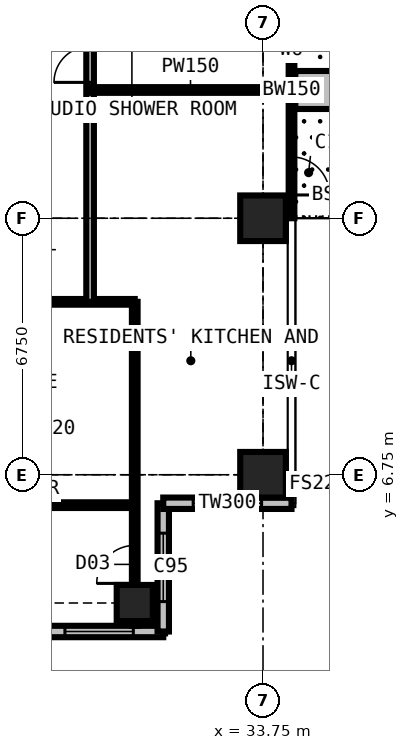
"""IFC4 building model, lengths in metres.
Left out: names, types, materials, properties, quantities, classifications, styles, units other than length and angle.
Written with IfcOpenShell. Run it as: python <this file> out.ifc"""

import sys

from ifc_helpers import new_model, si_unit, direction, frame, frame_2d, origin, origin_2d, place, context, subcontext, project, spatial, rectangle, extrude, element, fill, save


model = new_model("IFC4")
c1 = context("Model", 3, precision=1e-05, world=origin(), true_north=direction((0.0, 1.0)))
c2 = subcontext(c1, "Body", "Model", "MODEL_VIEW")
j1 = project(units=[si_unit("LENGTHUNIT", "METRE"), si_unit("PLANEANGLEUNIT", "RADIAN")], contexts=[c1])
p1 = place(None, origin())
s1 = spatial("IfcSite", under=j1, at=p1, CompositionType="ELEMENT")
p2 = place(p1, origin())
s2 = spatial("IfcBuilding", under=s1, at=p2, CompositionType="ELEMENT")
p3 = place(p2, frame((0.0, 0.0, 192.6)))
s3 = spatial("IfcBuildingStorey", under=s2, at=p3, CompositionType="ELEMENT", Elevation=192.6)
p4 = place(p3, frame((30.375, 3.375, 0.0), z_axis=(0.0, 0.0, 1.0), x_axis=(1.0, 0.0, 0.0)))
e1 = element("IfcColumn", 1, at=p4, inside=s3, PredefinedType="COLUMN", context=c2, shape_type="SweptSolid", body=[
    extrude(rectangle(XDim=0.95, YDim=0.95, at=origin_2d()), origin(), (0.0, 0.0, 1.0), 3.6),
])
for number, where, z_axis, x_axis in (
    (2, (33.75, 6.75, 0.0), (0.0, 0.0, 1.0), (1.0, 0.0, 0.0)),
    (3, (33.75, 13.5, 0.0), (0.0, 0.0, 1.0), (1.0, 0.0, 0.0)),
):
    element("IfcColumn", number, at=place(p3, frame(where, z_axis=z_axis, x_axis=x_axis)), inside=s3, PredefinedType="COLUMN", context=c2, shape_type="SweptSolid", body=[
        extrude(rectangle(XDim=1.2, YDim=1.2, at=origin_2d()), origin(), (0.0, 0.0, 1.0), 3.6),
    ])
p5 = place(p3, frame((34.5, 20.25, 0.0), z_axis=(0.0, 0.0, 1.0), x_axis=(0.0, -1.0, 0.0)))
e4 = element("IfcWall", 4, at=p5, inside=s3, PredefinedType="SOLIDWALL", context=c2, shape_type="SweptSolid", body=[
    extrude(rectangle(XDim=6.75, YDim=0.15, at=frame_2d((3.375, 0.0))), origin(), (0.0, 0.0, 1.0), 3.375),
])
p6 = place(p5, frame((0.613, 0.0, 0.0)))
e5 = element("IfcOpeningElement", 5, at=p6, cuts=e4, PredefinedType="OPENING", context=c2, shape_type="SweptSolid", body=[
    extrude(rectangle(XDim=1.0, YDim=2.2, at=frame_2d((0.5, 1.1))), frame((0.0, 0.085, 0.0), z_axis=(0.0, -1.0, 0.0), x_axis=(1.0, 0.0, 0.0)), (0.0, 0.0, 1.0), 0.17),
])
p7 = place(p5, frame((1.725, 0.0, 0.9)))
e6 = element("IfcOpeningElement", 6, at=p7, cuts=e4, PredefinedType="OPENING", context=c2, shape_type="SweptSolid", body=[
    extrude(rectangle(XDim=1.2, YDim=1.8, at=frame_2d((0.6, 0.9))), frame((0.0, 0.085, 0.0), z_axis=(0.0, -1.0, 0.0), x_axis=(1.0, 0.0, 0.0)), (0.0, 0.0, 1.0), 0.17),
])
p8 = place(p5, frame((5.137, 0.0, 0.0)))
e7 = element("IfcOpeningElement", 7, at=p8, cuts=e4, PredefinedType="OPENING", context=c2, shape_type="SweptSolid", body=[
    extrude(rectangle(XDim=1.0, YDim=2.2, at=frame_2d((0.5, 1.1))), frame((0.0, 0.085, 0.0), z_axis=(0.0, -1.0, 0.0), x_axis=(1.0, 0.0, 0.0)), (0.0, 0.0, 1.0), 0.17),
])
p9 = place(p5, frame((3.825, 0.0, 0.9)))
e8 = element("IfcOpeningElement", 8, at=p9, cuts=e4, PredefinedType="OPENING", context=c2, shape_type="SweptSolid", body=[
    extrude(rectangle(XDim=1.2, YDim=1.8, at=frame_2d((0.6, 0.9))), frame((0.0, 0.085, 0.0), z_axis=(0.0, -1.0, 0.0), x_axis=(1.0, 0.0, 0.0)), (0.0, 0.0, 1.0), 0.17),
])
p10 = place(p3, frame((27.75, 2.625, 0.0), z_axis=(0.0, 0.0, 1.0), x_axis=(1.0, 0.0, 0.0)))
e9 = element("IfcWall", 9, at=p10, inside=s3, PredefinedType="SOLIDWALL", context=c2, shape_type="SweptSolid", body=[
    extrude(rectangle(XDim=3.375, YDim=0.3, at=frame_2d((1.688, 0.0))), origin(), (0.0, 0.0, 1.0), 3.375),
])
p11 = place(p10, frame((0.788, 0.0, 0.6)))
e10 = element("IfcOpeningElement", 10, at=p11, cuts=e9, PredefinedType="OPENING", context=c2, shape_type="SweptSolid", body=[
    extrude(rectangle(XDim=1.8, YDim=2.1, at=frame_2d((0.9, 1.05))), frame((0.0, 0.16, 0.0), z_axis=(0.0, -1.0, 0.0), x_axis=(1.0, 0.0, 0.0)), (0.0, 0.0, 1.0), 0.32),
])
p12 = place(p3, frame((31.125, 2.625, 0.0), z_axis=(0.0, 0.0, 1.0), x_axis=(0.0, 1.0, 0.0)))
e11 = element("IfcWall", 11, at=p12, inside=s3, PredefinedType="SOLIDWALL", context=c2, shape_type="SweptSolid", body=[
    extrude(rectangle(XDim=3.375, YDim=0.3, at=frame_2d((1.688, 0.0))), origin(), (0.0, 0.0, 1.0), 3.375),
])
p13 = place(p12, frame((0.788, 0.0, 0.6)))
e12 = element("IfcOpeningElement", 12, at=p13, cuts=e11, PredefinedType="OPENING", context=c2, shape_type="SweptSolid", body=[
    extrude(rectangle(XDim=1.8, YDim=2.1, at=frame_2d((0.9, 1.05))), frame((0.0, 0.16, 0.0), z_axis=(0.0, -1.0, 0.0), x_axis=(1.0, 0.0, 0.0)), (0.0, 0.0, 1.0), 0.32),
])
p14 = place(p3, frame((31.125, 6.0, 0.0), z_axis=(0.0, 0.0, 1.0), x_axis=(1.0, 0.0, 0.0)))
e13 = element("IfcWall", 13, at=p14, inside=s3, PredefinedType="SOLIDWALL", context=c2, shape_type="SweptSolid", body=[
    extrude(rectangle(XDim=3.375, YDim=0.3, at=frame_2d((1.688, 0.0))), origin(), (0.0, 0.0, 1.0), 3.375),
])
p15 = place(p14, frame((0.788, 0.0, 0.6)))
e14 = element("IfcOpeningElement", 14, at=p15, cuts=e13, PredefinedType="OPENING", context=c2, shape_type="SweptSolid", body=[
    extrude(rectangle(XDim=1.8, YDim=2.1, at=frame_2d((0.9, 1.05))), frame((0.0, 0.16, 0.0), z_axis=(0.0, -1.0, 0.0), x_axis=(1.0, 0.0, 0.0)), (0.0, 0.0, 1.0), 0.32),
])
p16 = place(p3, frame((34.6, 16.875, 0.0), z_axis=(0.0, 0.0, 1.0), x_axis=(1.0, 0.0, 0.0)))
e15 = element("IfcWall", 15, at=p16, inside=s3, PredefinedType="USERDEFINED", context=c2, shape_type="SweptSolid", body=[
    extrude(rectangle(XDim=2.2, YDim=1.0, at=frame_2d((1.1, 0.0))), origin(), (0.0, 0.0, 1.0), 0.9),
])
p17 = place(p3, frame((10.125, 11.3, 0.0), z_axis=(0.0, 0.0, 1.0), x_axis=(1.0, 0.0, 0.0)))
e16 = element("IfcWall", 16, at=p17, inside=s3, PredefinedType="PARTITIONING", context=c2, shape_type="SweptSolid", body=[
    extrude(rectangle(XDim=20.25, YDim=0.15, at=frame_2d((10.125, 0.0))), origin(), (0.0, 0.0, 1.0), 3.375),
])
p18 = place(p17, frame((8.375, 0.0, 0.0)))
e17 = element("IfcOpeningElement", 17, at=p18, cuts=e16, PredefinedType="OPENING", context=c2, shape_type="SweptSolid", body=[
    extrude(rectangle(XDim=1.0, YDim=2.2, at=frame_2d((0.5, 1.1))), frame((0.0, 0.085, 0.0), z_axis=(0.0, -1.0, 0.0), x_axis=(1.0, 0.0, 0.0)), (0.0, 0.0, 1.0), 0.17),
])
p19 = place(p17, frame((10.975, 0.0, 0.0)))
e18 = element("IfcOpeningElement", 18, at=p19, cuts=e16, PredefinedType="OPENING", context=c2, shape_type="SweptSolid", body=[
    extrude(rectangle(XDim=1.0, YDim=2.2, at=frame_2d((0.5, 1.1))), frame((0.0, 0.085, 0.0), z_axis=(0.0, -1.0, 0.0), x_axis=(1.0, 0.0, 0.0)), (0.0, 0.0, 1.0), 0.17),
])
p20 = place(p17, frame((4.875, 0.0, 0.0)))
e19 = element("IfcOpeningElement", 19, at=p20, cuts=e16, PredefinedType="OPENING", context=c2, shape_type="SweptSolid", body=[
    extrude(rectangle(XDim=0.95, YDim=2.2, at=frame_2d((0.475, 1.1))), frame((0.0, 0.085, 0.0), z_axis=(0.0, -1.0, 0.0), x_axis=(1.0, 0.0, 0.0)), (0.0, 0.0, 1.0), 0.17),
])
p21 = place(p3, frame((27.725, 5.95, 0.0), z_axis=(0.0, 0.0, 1.0), x_axis=(1.0, 0.0, 0.0)))
e20 = element("IfcWall", 20, at=p21, inside=s3, PredefinedType="PARTITIONING", context=c2, shape_type="SweptSolid", body=[
    extrude(rectangle(XDim=2.65, YDim=0.15, at=frame_2d((1.325, 0.0))), origin(), (0.0, 0.0, 1.0), 3.375),
])
p22 = place(p3, frame((29.2, 11.3, 0.0), z_axis=(0.0, 0.0, 1.0), x_axis=(0.0, 1.0, 0.0)))
e21 = element("IfcWall", 21, at=p22, inside=s3, PredefinedType="PARTITIONING", context=c2, shape_type="SweptSolid", body=[
    extrude(rectangle(XDim=17.9, YDim=0.2, at=frame_2d((8.95, 0.0))), origin(), (0.0, 0.0, 1.0), 3.375),
])
p23 = place(p22, frame((5.775, 0.0, 0.0)))
e22 = element("IfcOpeningElement", 22, at=p23, cuts=e21, PredefinedType="OPENING", context=c2, shape_type="SweptSolid", body=[
    extrude(rectangle(XDim=0.95, YDim=2.2, at=frame_2d((0.475, 1.1))), frame((0.0, 0.11, 0.0), z_axis=(0.0, -1.0, 0.0), x_axis=(1.0, 0.0, 0.0)), (0.0, 0.0, 1.0), 0.22),
])
p24 = place(p22, frame((9.2, 0.0, 0.0)))
e23 = element("IfcOpeningElement", 23, at=p24, cuts=e21, PredefinedType="OPENING", context=c2, shape_type="SweptSolid", body=[
    extrude(rectangle(XDim=0.95, YDim=2.2, at=frame_2d((0.475, 1.1))), frame((0.0, 0.11, 0.0), z_axis=(0.0, -1.0, 0.0), x_axis=(1.0, 0.0, 0.0)), (0.0, 0.0, 1.0), 0.22),
])
p25 = place(p22, frame((12.575, 0.0, 0.0)))
e24 = element("IfcOpeningElement", 24, at=p25, cuts=e21, PredefinedType="OPENING", context=c2, shape_type="SweptSolid", body=[
    extrude(rectangle(XDim=0.95, YDim=2.2, at=frame_2d((0.475, 1.1))), frame((0.0, 0.11, 0.0), z_axis=(0.0, -1.0, 0.0), x_axis=(1.0, 0.0, 0.0)), (0.0, 0.0, 1.0), 0.22),
])
p26 = place(p22, frame((16.3, 0.0, 0.0)))
e25 = element("IfcOpeningElement", 25, at=p26, cuts=e21, PredefinedType="OPENING", context=c2, shape_type="SweptSolid", body=[
    extrude(rectangle(XDim=1.0, YDim=2.2, at=frame_2d((0.5, 1.1))), frame((0.0, 0.11, 0.0), z_axis=(0.0, -1.0, 0.0), x_axis=(1.0, 0.0, 0.0)), (0.0, 0.0, 1.0), 0.22),
])
p27 = place(p3, frame((29.2, 16.875, 0.0), z_axis=(0.0, 0.0, 1.0), x_axis=(1.0, 0.0, 0.0)))
e26 = element("IfcWall", 26, at=p27, inside=s3, PredefinedType="PARTITIONING", context=c2, shape_type="SweptSolid", body=[
    extrude(rectangle(XDim=5.284, YDim=0.15, at=frame_2d((2.642, 0.0))), origin(), (0.0, 0.0, 1.0), 3.375),
])
p28 = place(p3, frame((30.375, 2.775, 0.0), z_axis=(0.0, 0.0, 1.0), x_axis=(0.0, 1.0, 0.0)))
e27 = element("IfcWall", 27, at=p28, inside=s3, PredefinedType="PARTITIONING", context=c2, shape_type="SweptSolid", body=[
    extrude(rectangle(XDim=8.525, YDim=0.15, at=frame_2d((4.263, 0.0))), origin(), (0.0, 0.0, 1.0), 2.877),
])
p29 = place(p28, frame((1.116, 0.0, 0.0)))
e28 = element("IfcOpeningElement", 28, at=p29, cuts=e27, PredefinedType="OPENING", context=c2, shape_type="SweptSolid", body=[
    extrude(rectangle(XDim=1.0, YDim=2.2, at=frame_2d((0.5, 1.1))), frame((0.0, 0.085, 0.0), z_axis=(0.0, -1.0, 0.0), x_axis=(1.0, 0.0, 0.0)), (0.0, 0.0, 1.0), 0.17),
])
p30 = place(p7, origin())
e29 = element("IfcWindow", 29, at=p30, inside=s3, PartitioningType="SINGLE_PANEL", PredefinedType="WINDOW", context=c2, shape_type="SweptSolid", body=[
    extrude(rectangle(XDim=1.2, YDim=1.8, at=frame_2d((0.6, 0.9))), frame((0.0, 0.03, 0.0), z_axis=(0.0, -1.0, 0.0), x_axis=(1.0, 0.0, 0.0)), (0.0, 0.0, 1.0), 0.06),
])
fill(e6, e29)
p31 = place(p8, origin())
e30 = element("IfcDoor", 30, at=p31, inside=s3, OperationType="SINGLE_SWING_RIGHT", PredefinedType="DOOR", context=c2, shape_type="SweptSolid", body=[
    extrude(rectangle(XDim=1.0, YDim=2.2, at=frame_2d((0.5, 1.1))), frame((0.0, 0.025, 0.0), z_axis=(0.0, -1.0, 0.0), x_axis=(1.0, 0.0, 0.0)), (0.0, 0.0, 1.0), 0.05),
])
fill(e7, e30)
p32 = place(p9, origin())
e31 = element("IfcWindow", 31, at=p32, inside=s3, PartitioningType="SINGLE_PANEL", PredefinedType="WINDOW", context=c2, shape_type="SweptSolid", body=[
    extrude(rectangle(XDim=1.2, YDim=1.8, at=frame_2d((0.6, 0.9))), frame((0.0, 0.03, 0.0), z_axis=(0.0, -1.0, 0.0), x_axis=(1.0, 0.0, 0.0)), (0.0, 0.0, 1.0), 0.06),
])
fill(e8, e31)
p33 = place(p11, origin())
e32 = element("IfcWindow", 32, at=p33, inside=s3, PartitioningType="SINGLE_PANEL", PredefinedType="WINDOW", context=c2, shape_type="SweptSolid", body=[
    extrude(rectangle(XDim=1.8, YDim=2.1, at=frame_2d((0.9, 1.05))), frame((0.0, 0.03, 0.0), z_axis=(0.0, -1.0, 0.0), x_axis=(1.0, 0.0, 0.0)), (0.0, 0.0, 1.0), 0.06),
])
fill(e10, e32)
p34 = place(p13, origin())
e33 = element("IfcWindow", 33, at=p34, inside=s3, PartitioningType="SINGLE_PANEL", PredefinedType="WINDOW", context=c2, shape_type="SweptSolid", body=[
    extrude(rectangle(XDim=1.8, YDim=2.1, at=frame_2d((0.9, 1.05))), frame((0.0, 0.03, 0.0), z_axis=(0.0, -1.0, 0.0), x_axis=(1.0, 0.0, 0.0)), (0.0, 0.0, 1.0), 0.06),
])
fill(e12, e33)
p35 = place(p15, origin())
e34 = element("IfcWindow", 34, at=p35, inside=s3, PartitioningType="SINGLE_PANEL", PredefinedType="WINDOW", context=c2, shape_type="SweptSolid", body=[
    extrude(rectangle(XDim=1.8, YDim=2.1, at=frame_2d((0.9, 1.05))), frame((0.0, 0.03, 0.0), z_axis=(0.0, -1.0, 0.0), x_axis=(1.0, 0.0, 0.0)), (0.0, 0.0, 1.0), 0.06),
])
fill(e14, e34)
p36 = place(p29, origin())
e35 = element("IfcDoor", 35, at=p36, inside=s3, OperationType="SINGLE_SWING_LEFT", PredefinedType="DOOR", context=c2, shape_type="SweptSolid", body=[
    extrude(rectangle(XDim=1.0, YDim=2.2, at=frame_2d((0.5, 1.1))), frame((0.0, 0.025, 0.0), z_axis=(0.0, -1.0, 0.0), x_axis=(1.0, 0.0, 0.0)), (0.0, 0.0, 1.0), 0.05),
])
fill(e28, e35)
p37 = place(p23, origin())
e36 = element("IfcDoor", 36, at=p37, inside=s3, OperationType="SINGLE_SWING_LEFT", PredefinedType="DOOR", context=c2, shape_type="SweptSolid", body=[
    extrude(rectangle(XDim=0.95, YDim=2.2, at=frame_2d((0.475, 1.1))), frame((0.0, 0.025, 0.0), z_axis=(0.0, -1.0, 0.0), x_axis=(1.0, 0.0, 0.0)), (0.0, 0.0, 1.0), 0.05),
])
fill(e22, e36)
save(model, sys.argv[1])
